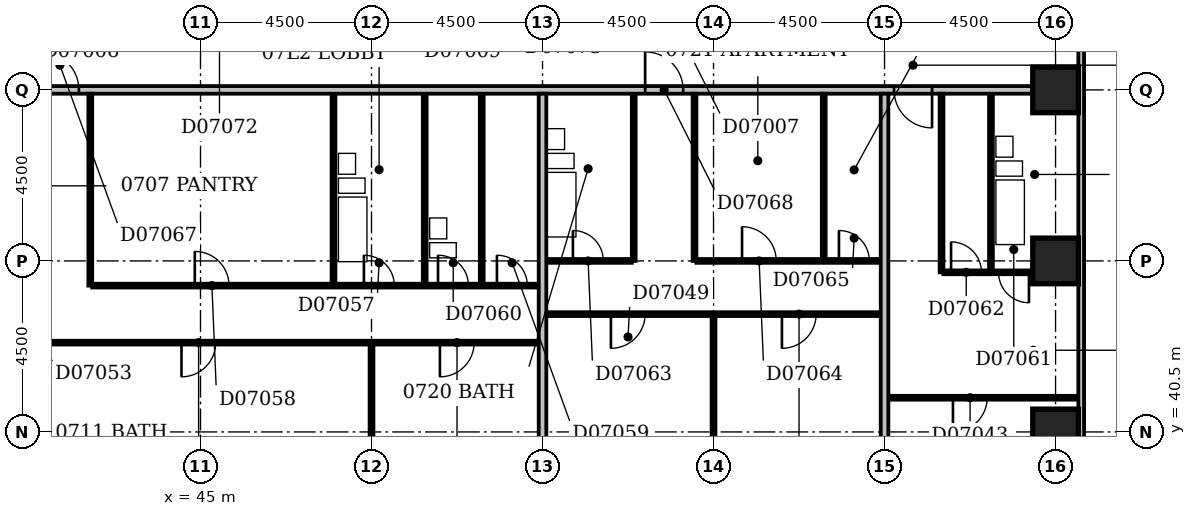
"""IFC4 building model, lengths in metres.
Left out: names, types, materials, properties, quantities, classifications, styles, units other than length and angle.
Written with IfcOpenShell. Run it as: python <this file> out.ifc"""

import sys

from ifc_helpers import new_model, si_unit, direction, frame, frame_2d, origin, origin_2d, place, context, subcontext, project, spatial, rectangle, extrude, element, fill, save


model = new_model("IFC4")
c1 = context("Model", 3, precision=1e-05, world=origin(), true_north=direction((0.0, 1.0)))
c2 = subcontext(c1, "Body", "Model", "MODEL_VIEW")
j1 = project(units=[si_unit("LENGTHUNIT", "METRE"), si_unit("PLANEANGLEUNIT", "RADIAN")], contexts=[c1])
p1 = place(None, origin())
s1 = spatial("IfcSite", under=j1, at=p1, CompositionType="ELEMENT")
p2 = place(p1, origin())
s2 = spatial("IfcBuilding", under=s1, at=p2, CompositionType="ELEMENT")
p3 = place(p2, frame((0.0, 0.0, 36.2)))
s3 = spatial("IfcBuildingStorey", under=s2, at=p3, CompositionType="ELEMENT", Elevation=36.2)
for number, where, z_axis, x_axis in (
    (1, (67.5, 40.5, -0.3), (0.0, 0.0, 1.0), (1.0, 0.0, 0.0)),
    (2, (67.5, 45.0, -0.3), (0.0, 0.0, 1.0), (1.0, 0.0, 0.0)),
    (3, (67.5, 49.5, -0.3), (0.0, 0.0, 1.0), (1.0, 0.0, 0.0)),
):
    element("IfcColumn", number, at=place(p3, frame(where, z_axis=z_axis, x_axis=x_axis)), inside=s3, PredefinedType="COLUMN", context=c2, shape_type="SweptSolid", body=[
        extrude(rectangle(XDim=1.2, YDim=1.2, at=origin_2d()), origin(), (0.0, 0.0, 1.0), 3.6),
    ])
p4 = place(p3, frame((68.175, 35.4, 0.0), z_axis=(0.0, 0.0, 1.0), x_axis=(0.0, 1.0, 0.0)))
e4 = element("IfcWall", 4, at=p4, inside=s3, PredefinedType="STANDARD", context=c2, shape_type="SweptSolid", body=[
    extrude(rectangle(XDim=23.85, YDim=0.15, at=frame_2d((11.925, 0.0))), origin(), (0.0, 0.0, 1.0), 2.7),
])
p5 = place(p4, frame((1.65, 0.0, 0.6)))
e5 = element("IfcOpeningElement", 5, at=p5, cuts=e4, PredefinedType="OPENING", context=c2, shape_type="SweptSolid", body=[
    extrude(rectangle(XDim=2.4, YDim=1.8, at=frame_2d((1.2, 0.9))), frame((0.0, 0.087, 0.0), z_axis=(0.0, -1.0, 0.0), x_axis=(1.0, 0.0, 0.0)), (0.0, 0.0, 1.0), 0.174),
])
p6 = place(p4, frame((19.65, 0.0, 0.6)))
e6 = element("IfcOpeningElement", 6, at=p6, cuts=e4, PredefinedType="OPENING", context=c2, shape_type="SweptSolid", body=[
    extrude(rectangle(XDim=2.4, YDim=1.8, at=frame_2d((1.2, 0.9))), frame((0.0, 0.087, 0.0), z_axis=(0.0, -1.0, 0.0), x_axis=(1.0, 0.0, 0.0)), (0.0, 0.0, 1.0), 0.174),
])
p7 = place(p3, frame((49.5, 36.6, 0.0), z_axis=(0.0, 0.0, 1.0), x_axis=(0.0, 1.0, 0.0)))
e7 = element("IfcWall", 7, at=p7, inside=s3, PredefinedType="PARTITIONING", context=c2, shape_type="SweptSolid", body=[
    extrude(rectangle(XDim=6.2, YDim=0.1, at=frame_2d((3.1, 0.0))), origin(), (0.0, 0.0, 1.0), 3.3),
])
p8 = place(p3, frame((54.0, 36.6, 0.0), z_axis=(0.0, 0.0, 1.0), x_axis=(0.0, 1.0, 0.0)))
e8 = element("IfcWall", 8, at=p8, inside=s3, PredefinedType="PARTITIONING", context=c2, shape_type="SweptSolid", body=[
    extrude(rectangle(XDim=12.8, YDim=0.2, at=frame_2d((6.4, 0.0))), origin(), (0.0, 0.0, 1.0), 2.6),
])
p9 = place(p3, frame((58.5, 36.6, 0.0), z_axis=(0.0, 0.0, 1.0), x_axis=(0.0, 1.0, 0.0)))
e9 = element("IfcWall", 9, at=p9, inside=s3, PredefinedType="PARTITIONING", context=c2, shape_type="SweptSolid", body=[
    extrude(rectangle(XDim=6.95, YDim=0.1, at=frame_2d((3.475, 0.0))), origin(), (0.0, 0.0, 1.0), 3.3),
])
p10 = place(p3, frame((63.0, 36.6, 0.0), z_axis=(0.0, 0.0, 1.0), x_axis=(0.0, 1.0, 0.0)))
e10 = element("IfcWall", 10, at=p10, inside=s3, PredefinedType="PARTITIONING", context=c2, shape_type="SweptSolid", body=[
    extrude(rectangle(XDim=12.8, YDim=0.2, at=frame_2d((6.4, 0.0))), origin(), (0.0, 0.0, 1.0), 2.4),
])
p11 = place(p3, frame((63.1, 41.4, 0.0), z_axis=(0.0, 0.0, 1.0), x_axis=(1.0, 0.0, 0.0)))
e11 = element("IfcWall", 11, at=p11, inside=s3, PredefinedType="PARTITIONING", context=c2, shape_type="SweptSolid", body=[
    extrude(rectangle(XDim=5.0, YDim=0.1, at=frame_2d((2.5, 0.0))), origin(), (0.0, 0.0, 1.0), 3.3),
])
p12 = place(p11, frame((1.7, 0.0, 0.0)))
e12 = element("IfcOpeningElement", 12, at=p12, cuts=e11, PredefinedType="OPENING", context=c2, shape_type="SweptSolid", body=[
    extrude(rectangle(XDim=0.9, YDim=2.1, at=frame_2d((0.45, 1.05))), frame((0.0, 0.062, 0.0), z_axis=(0.0, -1.0, 0.0), x_axis=(1.0, 0.0, 0.0)), (0.0, 0.0, 1.0), 0.124),
])
p13 = place(p3, frame((40.6, 42.85, 0.0), z_axis=(0.0, 0.0, 1.0), x_axis=(1.0, 0.0, 0.0)))
e13 = element("IfcWall", 13, at=p13, inside=s3, PredefinedType="PARTITIONING", context=c2, shape_type="SweptSolid", body=[
    extrude(rectangle(XDim=13.3, YDim=0.1, at=frame_2d((6.65, 0.0))), origin(), (0.0, 0.0, 1.0), 3.3),
])
p14 = place(p13, frame((3.9, 0.0, 0.0)))
e14 = element("IfcOpeningElement", 14, at=p14, cuts=e13, PredefinedType="OPENING", context=c2, shape_type="SweptSolid", body=[
    extrude(rectangle(XDim=0.9, YDim=2.1, at=frame_2d((0.45, 1.05))), frame((0.0, 0.062, 0.0), z_axis=(0.0, -1.0, 0.0), x_axis=(1.0, 0.0, 0.0)), (0.0, 0.0, 1.0), 0.124),
])
p15 = place(p13, frame((10.7, 0.0, 0.0)))
e15 = element("IfcOpeningElement", 15, at=p15, cuts=e13, PredefinedType="OPENING", context=c2, shape_type="SweptSolid", body=[
    extrude(rectangle(XDim=0.9, YDim=2.1, at=frame_2d((0.45, 1.05))), frame((0.0, 0.062, 0.0), z_axis=(0.0, -1.0, 0.0), x_axis=(1.0, 0.0, 0.0)), (0.0, 0.0, 1.0), 0.124),
])
p16 = place(p3, frame((54.1, 43.6, 0.0), z_axis=(0.0, 0.0, 1.0), x_axis=(1.0, 0.0, 0.0)))
e16 = element("IfcWall", 16, at=p16, inside=s3, PredefinedType="PARTITIONING", context=c2, shape_type="SweptSolid", body=[
    extrude(rectangle(XDim=8.8, YDim=0.1, at=frame_2d((4.4, 0.0))), origin(), (0.0, 0.0, 1.0), 3.3),
])
p17 = place(p16, frame((1.7, 0.0, 0.0)))
e17 = element("IfcOpeningElement", 17, at=p17, cuts=e16, PredefinedType="OPENING", context=c2, shape_type="SweptSolid", body=[
    extrude(rectangle(XDim=0.9, YDim=2.1, at=frame_2d((0.45, 1.05))), frame((0.0, 0.062, 0.0), z_axis=(0.0, -1.0, 0.0), x_axis=(1.0, 0.0, 0.0)), (0.0, 0.0, 1.0), 0.124),
])
p18 = place(p16, frame((6.2, 0.0, 0.0)))
e18 = element("IfcOpeningElement", 18, at=p18, cuts=e16, PredefinedType="OPENING", context=c2, shape_type="SweptSolid", body=[
    extrude(rectangle(XDim=0.9, YDim=2.1, at=frame_2d((0.45, 1.05))), frame((0.0, 0.062, 0.0), z_axis=(0.0, -1.0, 0.0), x_axis=(1.0, 0.0, 0.0)), (0.0, 0.0, 1.0), 0.124),
])
p19 = place(p3, frame((42.1, 44.35, 0.0), z_axis=(0.0, 0.0, 1.0), x_axis=(0.0, 1.0, 0.0)))
e19 = element("IfcWall", 19, at=p19, inside=s3, PredefinedType="PARTITIONING", context=c2, shape_type="SweptSolid", body=[
    extrude(rectangle(XDim=5.05, YDim=0.1, at=frame_2d((2.525, 0.0))), origin(), (0.0, 0.0, 1.0), 3.3),
])
p20 = place(p3, frame((42.15, 44.35, 0.0), z_axis=(0.0, 0.0, 1.0), x_axis=(1.0, 0.0, 0.0)))
e20 = element("IfcWall", 20, at=p20, inside=s3, PredefinedType="PARTITIONING", context=c2, shape_type="SweptSolid", body=[
    extrude(rectangle(XDim=11.75, YDim=0.1, at=frame_2d((5.875, 0.0))), origin(), (0.0, 0.0, 1.0), 3.3),
])
p21 = place(p20, frame((7.15, 0.0, 0.0)))
e21 = element("IfcOpeningElement", 21, at=p21, cuts=e20, PredefinedType="OPENING", context=c2, shape_type="SweptSolid", body=[
    extrude(rectangle(XDim=0.8, YDim=2.1, at=frame_2d((0.4, 1.05))), frame((0.0, 0.062, 0.0), z_axis=(0.0, -1.0, 0.0), x_axis=(1.0, 0.0, 0.0)), (0.0, 0.0, 1.0), 0.124),
])
p22 = place(p20, frame((2.7, 0.0, 0.0)))
e22 = element("IfcOpeningElement", 22, at=p22, cuts=e20, PredefinedType="OPENING", context=c2, shape_type="SweptSolid", body=[
    extrude(rectangle(XDim=0.9, YDim=2.1, at=frame_2d((0.45, 1.05))), frame((0.0, 0.062, 0.0), z_axis=(0.0, -1.0, 0.0), x_axis=(1.0, 0.0, 0.0)), (0.0, 0.0, 1.0), 0.124),
])
p23 = place(p20, frame((10.65, 0.0, 0.0)))
e23 = element("IfcOpeningElement", 23, at=p23, cuts=e20, PredefinedType="OPENING", context=c2, shape_type="SweptSolid", body=[
    extrude(rectangle(XDim=0.8, YDim=2.1, at=frame_2d((0.4, 1.05))), frame((0.0, 0.062, 0.0), z_axis=(0.0, -1.0, 0.0), x_axis=(1.0, 0.0, 0.0)), (0.0, 0.0, 1.0), 0.124),
])
p24 = place(p20, frame((9.1, 0.0, 0.0)))
e24 = element("IfcOpeningElement", 24, at=p24, cuts=e20, PredefinedType="OPENING", context=c2, shape_type="SweptSolid", body=[
    extrude(rectangle(XDim=0.8, YDim=2.1, at=frame_2d((0.4, 1.05))), frame((0.0, 0.062, 0.0), z_axis=(0.0, -1.0, 0.0), x_axis=(1.0, 0.0, 0.0)), (0.0, 0.0, 1.0), 0.124),
])
for number, where, z_axis, x_axis in (
    (25, (48.5, 44.4, 0.0), (0.0, 0.0, 1.0), (0.0, 1.0, 0.0)),
    (26, (50.9, 44.4, 0.0), (0.0, 0.0, 1.0), (0.0, 1.0, 0.0)),
    (27, (52.4, 44.4, 0.0), (0.0, 0.0, 1.0), (0.0, 1.0, 0.0)),
):
    element("IfcWall", number, at=place(p3, frame(where, z_axis=z_axis, x_axis=x_axis)), inside=s3, PredefinedType="PLUMBINGWALL", context=c2, shape_type="SweptSolid", body=[
        extrude(rectangle(XDim=5.0, YDim=0.1, at=frame_2d((2.5, 0.0))), origin(), (0.0, 0.0, 1.0), 3.3),
    ])
p25 = place(p3, frame((64.5, 44.7, 0.0), z_axis=(0.0, 0.0, 1.0), x_axis=(0.0, 1.0, 0.0)))
e28 = element("IfcWall", 28, at=p25, inside=s3, PredefinedType="PARTITIONING", context=c2, shape_type="SweptSolid", body=[
    extrude(rectangle(XDim=4.7, YDim=0.1, at=frame_2d((2.35, 0.0))), origin(), (0.0, 0.0, 1.0), 3.3),
])
p26 = place(p3, frame((64.55, 44.7, 0.0), z_axis=(0.0, 0.0, 1.0), x_axis=(1.0, 0.0, 0.0)))
e29 = element("IfcWall", 29, at=p26, inside=s3, PredefinedType="PARTITIONING", context=c2, shape_type="SweptSolid", body=[
    extrude(rectangle(XDim=2.35, YDim=0.1, at=frame_2d((1.175, 0.0))), origin(), (0.0, 0.0, 1.0), 3.3),
])
p27 = place(p26, frame((1.45, 0.0, 0.0)))
e30 = element("IfcOpeningElement", 30, at=p27, cuts=e29, PredefinedType="OPENING", context=c2, shape_type="SweptSolid", body=[
    extrude(rectangle(XDim=0.8, YDim=2.1, at=frame_2d((0.4, 1.05))), frame((0.0, 0.062, 0.0), z_axis=(0.0, -1.0, 0.0), x_axis=(1.0, 0.0, 0.0)), (0.0, 0.0, 1.0), 0.124),
])
p28 = place(p26, frame((0.2, 0.0, 0.0)))
e31 = element("IfcOpeningElement", 31, at=p28, cuts=e29, PredefinedType="OPENING", context=c2, shape_type="SweptSolid", body=[
    extrude(rectangle(XDim=0.8, YDim=2.1, at=frame_2d((0.4, 1.05))), frame((0.0, 0.062, 0.0), z_axis=(0.0, -1.0, 0.0), x_axis=(1.0, 0.0, 0.0)), (0.0, 0.0, 1.0), 0.124),
])
p29 = place(p3, frame((65.8, 44.75, 0.0), z_axis=(0.0, 0.0, 1.0), x_axis=(0.0, 1.0, 0.0)))
e32 = element("IfcWall", 32, at=p29, inside=s3, PredefinedType="PLUMBINGWALL", context=c2, shape_type="SweptSolid", body=[
    extrude(rectangle(XDim=4.65, YDim=0.1, at=frame_2d((2.325, 0.0))), origin(), (0.0, 0.0, 1.0), 3.3),
])
p30 = place(p3, frame((54.1, 45.0, 0.0), z_axis=(0.0, 0.0, 1.0), x_axis=(1.0, 0.0, 0.0)))
e33 = element("IfcWall", 33, at=p30, inside=s3, PredefinedType="PARTITIONING", context=c2, shape_type="SweptSolid", body=[
    extrude(rectangle(XDim=2.25, YDim=0.1, at=frame_2d((1.125, 0.0))), origin(), (0.0, 0.0, 1.0), 3.3),
])
p31 = place(p30, frame((0.7, 0.0, 0.0)))
e34 = element("IfcOpeningElement", 34, at=p31, cuts=e33, PredefinedType="OPENING", context=c2, shape_type="SweptSolid", body=[
    extrude(rectangle(XDim=0.8, YDim=2.1, at=frame_2d((0.4, 1.05))), frame((0.0, 0.062, 0.0), z_axis=(0.0, -1.0, 0.0), x_axis=(1.0, 0.0, 0.0)), (0.0, 0.0, 1.0), 0.124),
])
p32 = place(p3, frame((56.4, 45.0, 0.0), z_axis=(0.0, 0.0, 1.0), x_axis=(0.0, 1.0, 0.0)))
e35 = element("IfcWall", 35, at=p32, inside=s3, PredefinedType="PLUMBINGWALL", context=c2, shape_type="SweptSolid", body=[
    extrude(rectangle(XDim=4.4, YDim=0.1, at=frame_2d((2.2, 0.0))), origin(), (0.0, 0.0, 1.0), 3.3),
])
p33 = place(p3, frame((58.0, 45.0, 0.0), z_axis=(0.0, 0.0, 1.0), x_axis=(0.0, 1.0, 0.0)))
e36 = element("IfcWall", 36, at=p33, inside=s3, PredefinedType="PARTITIONING", context=c2, shape_type="SweptSolid", body=[
    extrude(rectangle(XDim=4.4, YDim=0.1, at=frame_2d((2.2, 0.0))), origin(), (0.0, 0.0, 1.0), 3.3),
])
p34 = place(p3, frame((58.05, 45.0, 0.0), z_axis=(0.0, 0.0, 1.0), x_axis=(1.0, 0.0, 0.0)))
e37 = element("IfcWall", 37, at=p34, inside=s3, PredefinedType="PARTITIONING", context=c2, shape_type="SweptSolid", body=[
    extrude(rectangle(XDim=4.85, YDim=0.1, at=frame_2d((2.425, 0.0))), origin(), (0.0, 0.0, 1.0), 3.3),
])
p35 = place(p34, frame((1.2, 0.0, 0.0)))
e38 = element("IfcOpeningElement", 38, at=p35, cuts=e37, PredefinedType="OPENING", context=c2, shape_type="SweptSolid", body=[
    extrude(rectangle(XDim=0.9, YDim=2.1, at=frame_2d((0.45, 1.05))), frame((0.0, 0.062, 0.0), z_axis=(0.0, -1.0, 0.0), x_axis=(1.0, 0.0, 0.0)), (0.0, 0.0, 1.0), 0.124),
])
p36 = place(p34, frame((3.75, 0.0, 0.0)))
e39 = element("IfcOpeningElement", 39, at=p36, cuts=e37, PredefinedType="OPENING", context=c2, shape_type="SweptSolid", body=[
    extrude(rectangle(XDim=0.8, YDim=2.1, at=frame_2d((0.4, 1.05))), frame((0.0, 0.062, 0.0), z_axis=(0.0, -1.0, 0.0), x_axis=(1.0, 0.0, 0.0)), (0.0, 0.0, 1.0), 0.124),
])
p37 = place(p3, frame((61.4, 45.05, 0.0), z_axis=(0.0, 0.0, 1.0), x_axis=(0.0, 1.0, 0.0)))
e40 = element("IfcWall", 40, at=p37, inside=s3, PredefinedType="PARTITIONING", context=c2, shape_type="SweptSolid", body=[
    extrude(rectangle(XDim=4.35, YDim=0.1, at=frame_2d((2.175, 0.0))), origin(), (0.0, 0.0, 1.0), 3.3),
])
p38 = place(p3, frame((9.1, 49.5, 0.0), z_axis=(0.0, 0.0, 1.0), x_axis=(1.0, 0.0, 0.0)))
e41 = element("IfcWall", 41, at=p38, inside=s3, PredefinedType="PARTITIONING", context=c2, shape_type="SweptSolid", body=[
    extrude(rectangle(XDim=57.8, YDim=0.2, at=frame_2d((28.9, 0.0))), origin(), (0.0, 0.0, 1.0), 3.3),
])
p39 = place(p38, frame((20.6, 0.0, 0.0)))
e42 = element("IfcOpeningElement", 42, at=p39, cuts=e41, PredefinedType="OPENING", context=c2, shape_type="SweptSolid", body=[
    extrude(rectangle(XDim=1.0, YDim=2.1, at=frame_2d((0.5, 1.05))), frame((0.0, 0.112, 0.0), z_axis=(0.0, -1.0, 0.0), x_axis=(1.0, 0.0, 0.0)), (0.0, 0.0, 1.0), 0.224),
])
p40 = place(p38, frame((31.7, 0.0, 0.0)))
e43 = element("IfcOpeningElement", 43, at=p40, cuts=e41, PredefinedType="OPENING", context=c2, shape_type="SweptSolid", body=[
    extrude(rectangle(XDim=1.0, YDim=2.1, at=frame_2d((0.5, 1.05))), frame((0.0, 0.112, 0.0), z_axis=(0.0, -1.0, 0.0), x_axis=(1.0, 0.0, 0.0)), (0.0, 0.0, 1.0), 0.224),
])
p41 = place(p38, frame((47.6, 0.0, 0.0)))
e44 = element("IfcOpeningElement", 44, at=p41, cuts=e41, PredefinedType="OPENING", context=c2, shape_type="SweptSolid", body=[
    extrude(rectangle(XDim=1.0, YDim=2.1, at=frame_2d((0.5, 1.05))), frame((0.0, 0.112, 0.0), z_axis=(0.0, -1.0, 0.0), x_axis=(1.0, 0.0, 0.0)), (0.0, 0.0, 1.0), 0.224),
])
p42 = place(p38, frame((54.15, 0.0, 0.0)))
e45 = element("IfcOpeningElement", 45, at=p42, cuts=e41, PredefinedType="OPENING", context=c2, shape_type="SweptSolid", body=[
    extrude(rectangle(XDim=1.0, YDim=2.1, at=frame_2d((0.5, 1.05))), frame((0.0, 0.112, 0.0), z_axis=(0.0, -1.0, 0.0), x_axis=(1.0, 0.0, 0.0)), (0.0, 0.0, 1.0), 0.224),
])
p43 = place(p38, frame((10.65, 0.0, 0.0)))
e46 = element("IfcOpeningElement", 46, at=p43, cuts=e41, PredefinedType="OPENING", context=c2, shape_type="SweptSolid", body=[
    extrude(rectangle(XDim=0.9, YDim=2.1, at=frame_2d((0.45, 1.05))), frame((0.0, 0.112, 0.0), z_axis=(0.0, -1.0, 0.0), x_axis=(1.0, 0.0, 0.0)), (0.0, 0.0, 1.0), 0.224),
])
p44 = place(p12, frame((0.9, 0.0, 0.0), z_axis=(0.0, 0.0, 1.0), x_axis=(-1.0, 0.0, 0.0)))
e47 = element("IfcDoor", 47, at=p44, inside=s3, OperationType="SINGLE_SWING_RIGHT", PredefinedType="DOOR", context=c2, shape_type="SweptSolid", body=[
    extrude(rectangle(XDim=0.9, YDim=2.1, at=frame_2d((0.45, 1.05))), frame((0.0, 0.025, 0.0), z_axis=(0.0, -1.0, 0.0), x_axis=(1.0, 0.0, 0.0)), (0.0, 0.0, 1.0), 0.05),
])
fill(e12, e47)
p45 = place(p14, frame((0.9, 0.0, 0.0), z_axis=(0.0, 0.0, 1.0), x_axis=(-1.0, 0.0, 0.0)))
e48 = element("IfcDoor", 48, at=p45, inside=s3, OperationType="SINGLE_SWING_RIGHT", PredefinedType="DOOR", context=c2, shape_type="SweptSolid", body=[
    extrude(rectangle(XDim=0.9, YDim=2.1, at=frame_2d((0.45, 1.05))), frame((0.0, 0.025, 0.0), z_axis=(0.0, -1.0, 0.0), x_axis=(1.0, 0.0, 0.0)), (0.0, 0.0, 1.0), 0.05),
])
fill(e14, e48)
p46 = place(p15, frame((0.9, 0.0, 0.0), z_axis=(0.0, 0.0, 1.0), x_axis=(-1.0, 0.0, 0.0)))
e49 = element("IfcDoor", 49, at=p46, inside=s3, OperationType="SINGLE_SWING_RIGHT", PredefinedType="DOOR", context=c2, shape_type="SweptSolid", body=[
    extrude(rectangle(XDim=0.9, YDim=2.1, at=frame_2d((0.45, 1.05))), frame((0.0, 0.025, 0.0), z_axis=(0.0, -1.0, 0.0), x_axis=(1.0, 0.0, 0.0)), (0.0, 0.0, 1.0), 0.05),
])
fill(e15, e49)
p47 = place(p17, frame((0.9, 0.0, 0.0), z_axis=(0.0, 0.0, 1.0), x_axis=(-1.0, 0.0, 0.0)))
e50 = element("IfcDoor", 50, at=p47, inside=s3, OperationType="SINGLE_SWING_RIGHT", PredefinedType="DOOR", context=c2, shape_type="SweptSolid", body=[
    extrude(rectangle(XDim=0.9, YDim=2.1, at=frame_2d((0.45, 1.05))), frame((0.0, 0.025, 0.0), z_axis=(0.0, -1.0, 0.0), x_axis=(1.0, 0.0, 0.0)), (0.0, 0.0, 1.0), 0.05),
])
fill(e17, e50)
p48 = place(p18, frame((0.9, 0.0, 0.0), z_axis=(0.0, 0.0, 1.0), x_axis=(-1.0, 0.0, 0.0)))
e51 = element("IfcDoor", 51, at=p48, inside=s3, OperationType="SINGLE_SWING_RIGHT", PredefinedType="DOOR", context=c2, shape_type="SweptSolid", body=[
    extrude(rectangle(XDim=0.9, YDim=2.1, at=frame_2d((0.45, 1.05))), frame((0.0, 0.025, 0.0), z_axis=(0.0, -1.0, 0.0), x_axis=(1.0, 0.0, 0.0)), (0.0, 0.0, 1.0), 0.05),
])
fill(e18, e51)
p49 = place(p21, origin())
e52 = element("IfcDoor", 52, at=p49, inside=s3, OperationType="SINGLE_SWING_LEFT", PredefinedType="DOOR", context=c2, shape_type="SweptSolid", body=[
    extrude(rectangle(XDim=0.8, YDim=2.1, at=frame_2d((0.4, 1.05))), frame((0.0, 0.025, 0.0), z_axis=(0.0, -1.0, 0.0), x_axis=(1.0, 0.0, 0.0)), (0.0, 0.0, 1.0), 0.05),
])
fill(e21, e52)
p50 = place(p22, origin())
e53 = element("IfcDoor", 53, at=p50, inside=s3, OperationType="SINGLE_SWING_LEFT", PredefinedType="DOOR", context=c2, shape_type="SweptSolid", body=[
    extrude(rectangle(XDim=0.9, YDim=2.1, at=frame_2d((0.45, 1.05))), frame((0.0, 0.025, 0.0), z_axis=(0.0, -1.0, 0.0), x_axis=(1.0, 0.0, 0.0)), (0.0, 0.0, 1.0), 0.05),
])
fill(e22, e53)
p51 = place(p23, origin())
e54 = element("IfcDoor", 54, at=p51, inside=s3, OperationType="SINGLE_SWING_LEFT", PredefinedType="DOOR", context=c2, shape_type="SweptSolid", body=[
    extrude(rectangle(XDim=0.8, YDim=2.1, at=frame_2d((0.4, 1.05))), frame((0.0, 0.025, 0.0), z_axis=(0.0, -1.0, 0.0), x_axis=(1.0, 0.0, 0.0)), (0.0, 0.0, 1.0), 0.05),
])
fill(e23, e54)
p52 = place(p24, origin())
e55 = element("IfcDoor", 55, at=p52, inside=s3, OperationType="SINGLE_SWING_LEFT", PredefinedType="DOOR", context=c2, shape_type="SweptSolid", body=[
    extrude(rectangle(XDim=0.8, YDim=2.1, at=frame_2d((0.4, 1.05))), frame((0.0, 0.025, 0.0), z_axis=(0.0, -1.0, 0.0), x_axis=(1.0, 0.0, 0.0)), (0.0, 0.0, 1.0), 0.05),
])
fill(e24, e55)
p53 = place(p27, origin())
e56 = element("IfcDoor", 56, at=p53, inside=s3, OperationType="SINGLE_SWING_RIGHT", PredefinedType="DOOR", context=c2, shape_type="SweptSolid", body=[
    extrude(rectangle(XDim=0.8, YDim=2.1, at=frame_2d((0.4, 1.05))), frame((0.0, 0.025, 0.0), z_axis=(0.0, -1.0, 0.0), x_axis=(1.0, 0.0, 0.0)), (0.0, 0.0, 1.0), 0.05),
])
fill(e30, e56)
p54 = place(p28, origin())
e57 = element("IfcDoor", 57, at=p54, inside=s3, OperationType="SINGLE_SWING_LEFT", PredefinedType="DOOR", context=c2, shape_type="SweptSolid", body=[
    extrude(rectangle(XDim=0.8, YDim=2.1, at=frame_2d((0.4, 1.05))), frame((0.0, 0.025, 0.0), z_axis=(0.0, -1.0, 0.0), x_axis=(1.0, 0.0, 0.0)), (0.0, 0.0, 1.0), 0.05),
])
fill(e31, e57)
p55 = place(p31, origin())
e58 = element("IfcDoor", 58, at=p55, inside=s3, OperationType="SINGLE_SWING_LEFT", PredefinedType="DOOR", context=c2, shape_type="SweptSolid", body=[
    extrude(rectangle(XDim=0.8, YDim=2.1, at=frame_2d((0.4, 1.05))), frame((0.0, 0.025, 0.0), z_axis=(0.0, -1.0, 0.0), x_axis=(1.0, 0.0, 0.0)), (0.0, 0.0, 1.0), 0.05),
])
fill(e34, e58)
p56 = place(p35, origin())
e59 = element("IfcDoor", 59, at=p56, inside=s3, OperationType="SINGLE_SWING_LEFT", PredefinedType="DOOR", context=c2, shape_type="SweptSolid", body=[
    extrude(rectangle(XDim=0.9, YDim=2.1, at=frame_2d((0.45, 1.05))), frame((0.0, 0.025, 0.0), z_axis=(0.0, -1.0, 0.0), x_axis=(1.0, 0.0, 0.0)), (0.0, 0.0, 1.0), 0.05),
])
fill(e38, e59)
p57 = place(p36, origin())
e60 = element("IfcDoor", 60, at=p57, inside=s3, OperationType="SINGLE_SWING_LEFT", PredefinedType="DOOR", context=c2, shape_type="SweptSolid", body=[
    extrude(rectangle(XDim=0.8, YDim=2.1, at=frame_2d((0.4, 1.05))), frame((0.0, 0.025, 0.0), z_axis=(0.0, -1.0, 0.0), x_axis=(1.0, 0.0, 0.0)), (0.0, 0.0, 1.0), 0.05),
])
fill(e39, e60)
p58 = place(p40, origin())
e61 = element("IfcDoor", 61, at=p58, inside=s3, OperationType="SINGLE_SWING_LEFT", PredefinedType="DOOR", context=c2, shape_type="SweptSolid", body=[
    extrude(rectangle(XDim=1.0, YDim=2.1, at=frame_2d((0.5, 1.05))), frame((0.0, 0.025, 0.0), z_axis=(0.0, -1.0, 0.0), x_axis=(1.0, 0.0, 0.0)), (0.0, 0.0, 1.0), 0.05),
])
fill(e43, e61)
p59 = place(p41, origin())
e62 = element("IfcDoor", 62, at=p59, inside=s3, OperationType="SINGLE_SWING_LEFT", PredefinedType="DOOR", context=c2, shape_type="SweptSolid", body=[
    extrude(rectangle(XDim=1.0, YDim=2.1, at=frame_2d((0.5, 1.05))), frame((0.0, 0.025, 0.0), z_axis=(0.0, -1.0, 0.0), x_axis=(1.0, 0.0, 0.0)), (0.0, 0.0, 1.0), 0.05),
])
fill(e44, e62)
p60 = place(p42, origin())
e63 = element("IfcDoor", 63, at=p60, inside=s3, OperationType="SINGLE_SWING_RIGHT", PredefinedType="DOOR", context=c2, shape_type="SweptSolid", body=[
    extrude(rectangle(XDim=1.0, YDim=2.1, at=frame_2d((0.5, 1.05))), frame((0.0, 0.025, 0.0), z_axis=(0.0, -1.0, 0.0), x_axis=(1.0, 0.0, 0.0)), (0.0, 0.0, 1.0), 0.05),
])
fill(e45, e63)
save(model, sys.argv[1])
